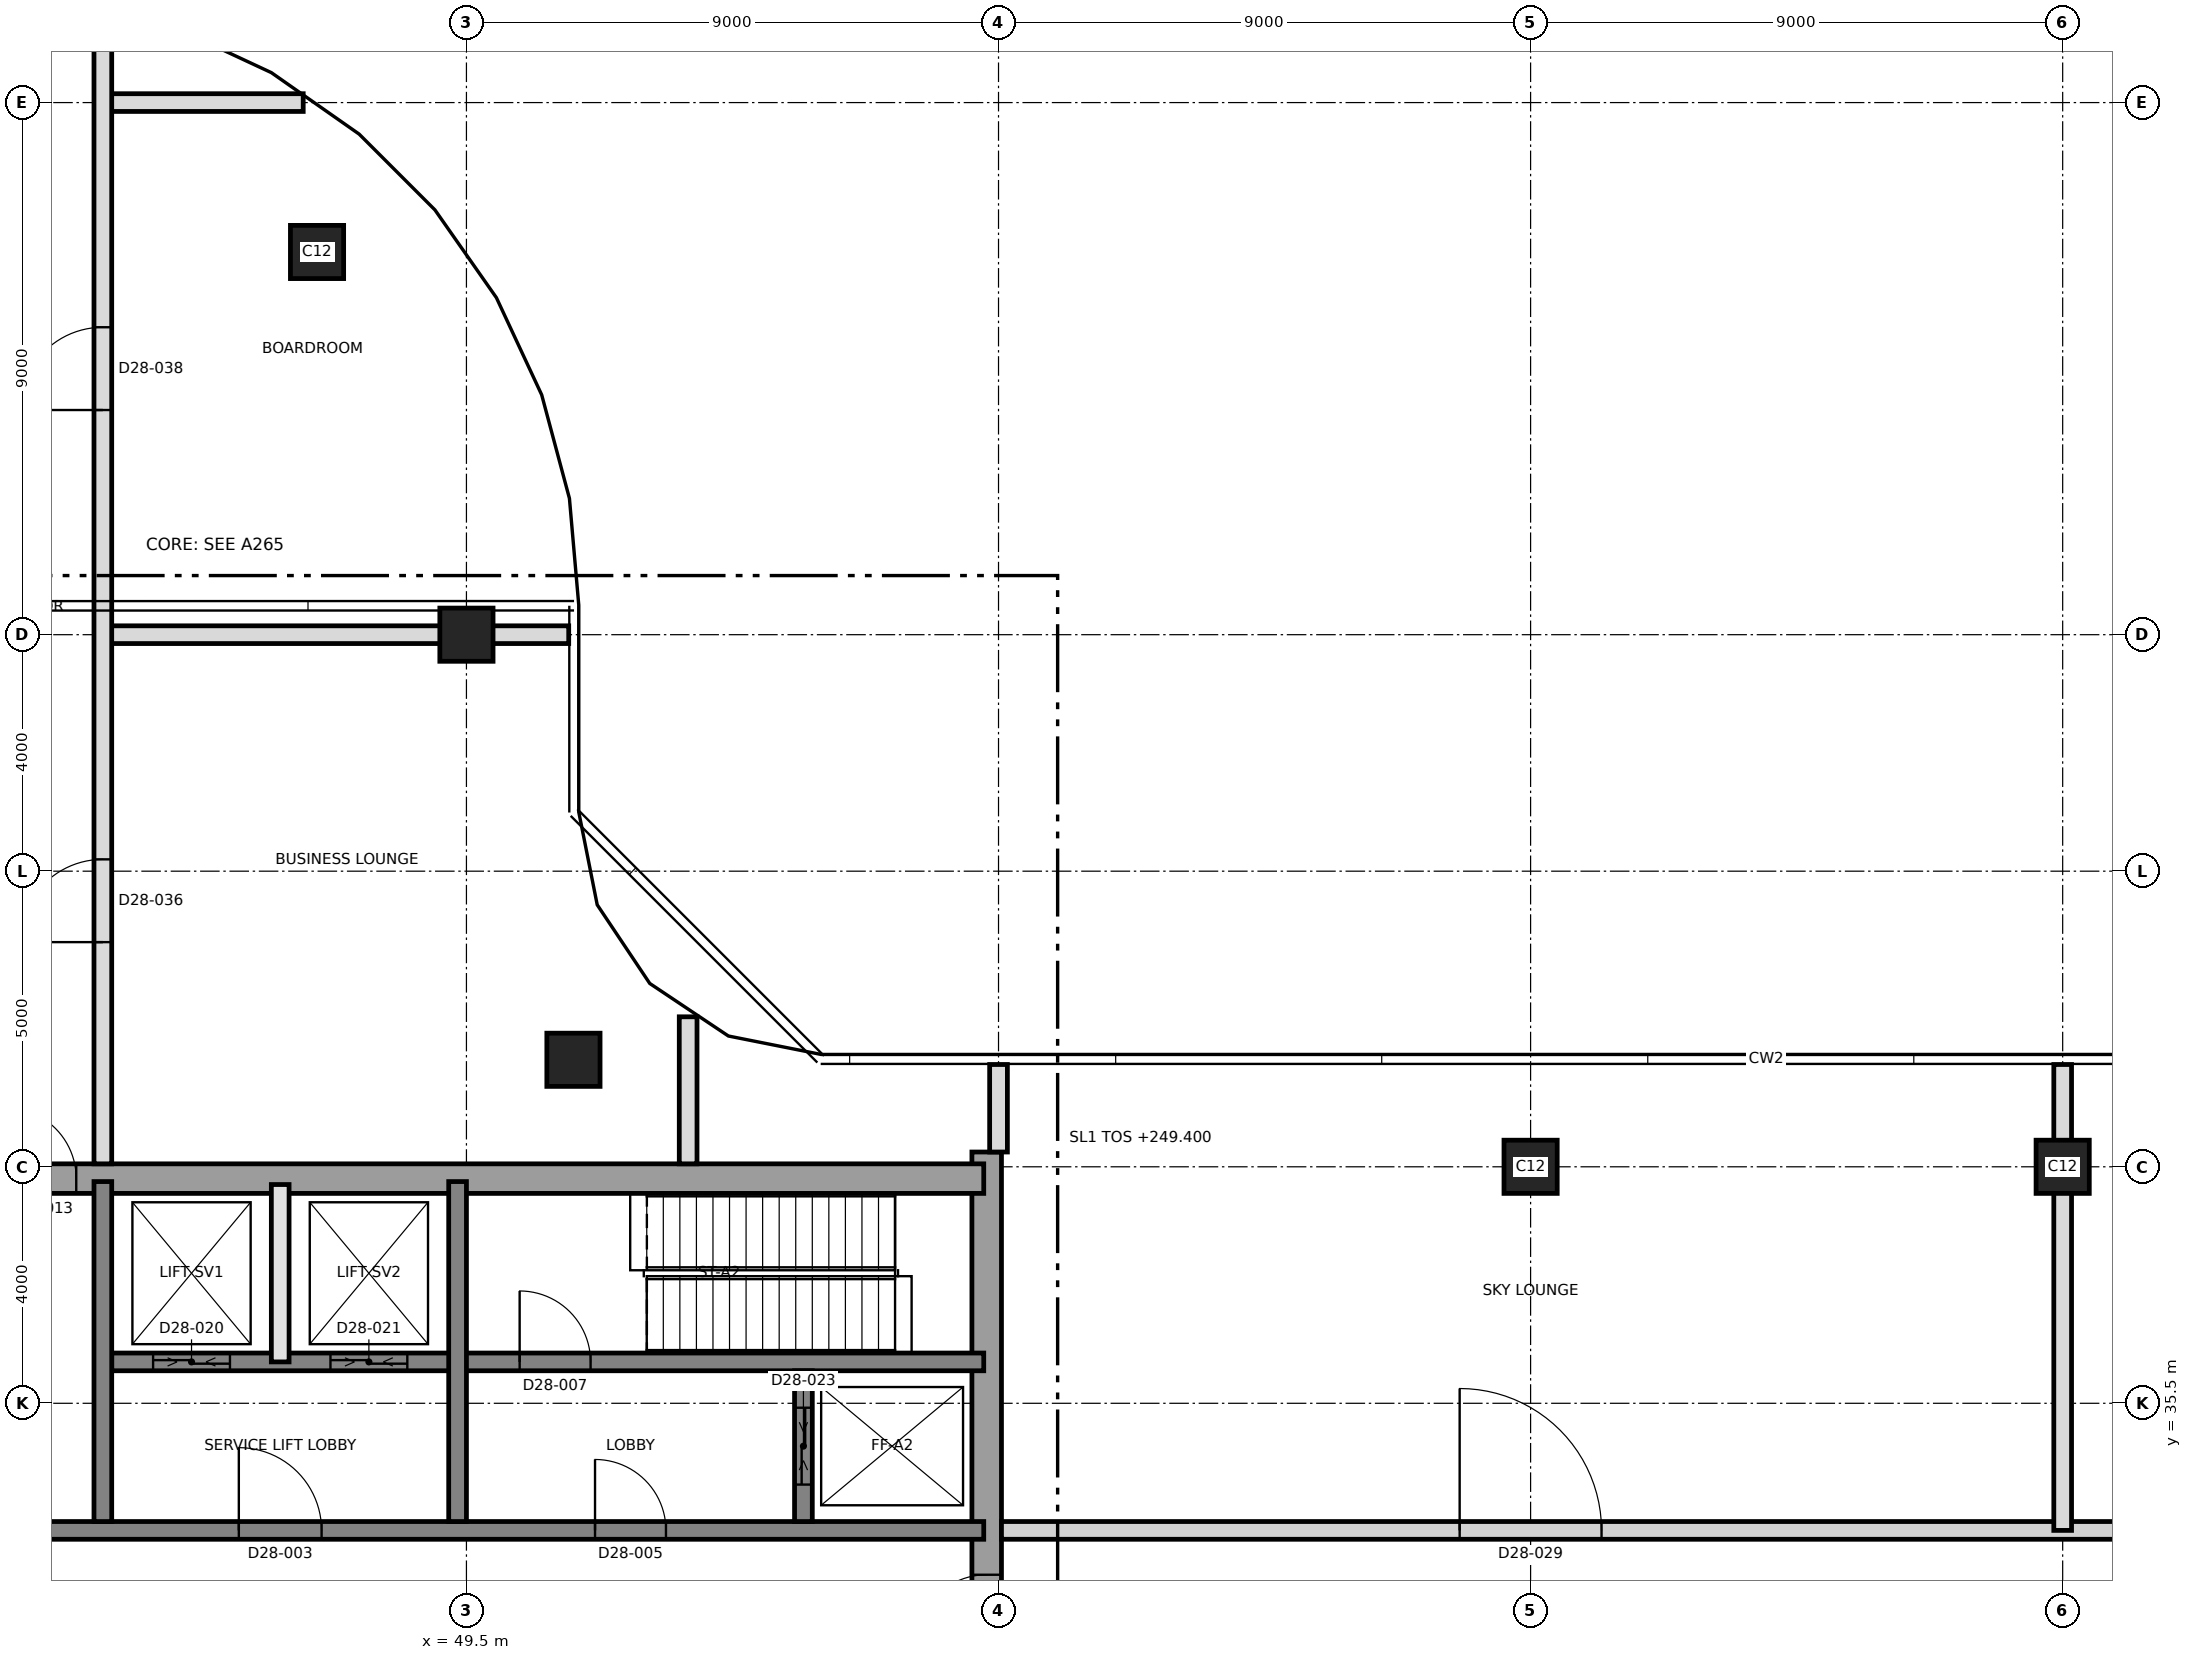
"""IFC4 building model, lengths in metres.
Left out: names, types, materials, properties, quantities, classifications, styles, units other than length and angle.
Written with IfcOpenShell. Run it as: python <this file> out.ifc"""

import sys

from ifc_helpers import new_model, si_unit, direction, frame, frame_2d, origin, origin_2d, place, context, subcontext, project, spatial, rectangle, extrude, element, fill, save


model = new_model("IFC4")
c1 = context("Model", 3, precision=1e-05, world=origin(), true_north=direction((0.0, 1.0)))
c2 = subcontext(c1, "Body", "Model", "MODEL_VIEW")
j1 = project(units=[si_unit("LENGTHUNIT", "METRE"), si_unit("PLANEANGLEUNIT", "RADIAN")], contexts=[c1])
p1 = place(None, origin())
s1 = spatial("IfcSite", under=j1, at=p1, CompositionType="ELEMENT")
p2 = place(p1, origin())
s2 = spatial("IfcBuilding", under=s1, at=p2, CompositionType="ELEMENT")
p3 = place(p2, frame((0.0, 0.0, 249.4)))
s3 = spatial("IfcBuildingStorey", under=s2, at=p3, CompositionType="ELEMENT", Elevation=249.4)
p4 = place(p3, frame((58.3, 21.25, 0.0), z_axis=(0.0, 0.0, 1.0), x_axis=(0.0, 1.0, 0.0)))
e1 = element("IfcWall", 1, at=p4, inside=s3, PredefinedType="SHEAR", context=c2, shape_type="SweptSolid", body=[
    extrude(rectangle(XDim=18.5, YDim=0.5, at=frame_2d((9.25, 0.0))), origin(), (0.0, 0.0, 1.0), 5.5),
])
p5 = place(p4, frame((10.15, 0.0, 0.0)))
e2 = element("IfcOpeningElement", 2, at=p5, cuts=e1, PredefinedType="OPENING", context=c2, shape_type="SweptSolid", body=[
    extrude(rectangle(XDim=1.2, YDim=2.1, at=frame_2d((0.6, 1.05))), frame((0.0, 0.26, 0.0), z_axis=(0.0, -1.0, 0.0), x_axis=(1.0, 0.0, 0.0)), (0.0, 0.0, 1.0), 0.52),
])
p6 = place(p3, frame((31.25, 39.3, 0.0), z_axis=(0.0, 0.0, 1.0), x_axis=(1.0, 0.0, 0.0)))
e3 = element("IfcWall", 3, at=p6, inside=s3, PredefinedType="SHEAR", context=c2, shape_type="SweptSolid", body=[
    extrude(rectangle(XDim=27.0, YDim=0.5, at=frame_2d((13.5, 0.0))), origin(), (0.0, 0.0, 1.0), 5.5),
])
p7 = place(p6, frame((10.45, 0.0, 0.0)))
e4 = element("IfcOpeningElement", 4, at=p7, cuts=e3, PredefinedType="OPENING", context=c2, shape_type="SweptSolid", body=[
    extrude(rectangle(XDim=1.2, YDim=2.1, at=frame_2d((0.6, 1.05))), frame((0.0, 0.26, 0.0), z_axis=(0.0, -1.0, 0.0), x_axis=(1.0, 0.0, 0.0)), (0.0, 0.0, 1.0), 0.52),
])
p8 = place(p3, frame((31.75, 33.35, 0.0), z_axis=(0.0, 0.0, 1.0), x_axis=(1.0, 0.0, 0.0)))
e5 = element("IfcWall", 5, at=p8, inside=s3, PredefinedType="SHEAR", context=c2, shape_type="SweptSolid", body=[
    extrude(rectangle(XDim=26.5, YDim=0.3, at=frame_2d((13.25, 0.0))), origin(), (0.0, 0.0, 1.0), 5.5),
])
p9 = place(p8, frame((13.9, 0.0, 0.0)))
e6 = element("IfcOpeningElement", 6, at=p9, cuts=e5, PredefinedType="OPENING", context=c2, shape_type="SweptSolid", body=[
    extrude(rectangle(XDim=1.4, YDim=2.1, at=frame_2d((0.7, 1.05))), frame((0.0, 0.16, 0.0), z_axis=(0.0, -1.0, 0.0), x_axis=(1.0, 0.0, 0.0)), (0.0, 0.0, 1.0), 0.32),
])
p10 = place(p8, frame((5.375, 0.0, 0.0)))
e7 = element("IfcOpeningElement", 7, at=p10, cuts=e5, PredefinedType="OPENING", context=c2, shape_type="SweptSolid", body=[
    extrude(rectangle(XDim=1.2, YDim=2.1, at=frame_2d((0.6, 1.05))), frame((0.0, 0.16, 0.0), z_axis=(0.0, -1.0, 0.0), x_axis=(1.0, 0.0, 0.0)), (0.0, 0.0, 1.0), 0.32),
])
p11 = place(p8, frame((19.925, 0.0, 0.0)))
e8 = element("IfcOpeningElement", 8, at=p11, cuts=e5, PredefinedType="OPENING", context=c2, shape_type="SweptSolid", body=[
    extrude(rectangle(XDim=1.2, YDim=2.1, at=frame_2d((0.6, 1.05))), frame((0.0, 0.16, 0.0), z_axis=(0.0, -1.0, 0.0), x_axis=(1.0, 0.0, 0.0)), (0.0, 0.0, 1.0), 0.32),
])
p12 = place(p3, frame((43.5, 36.2, 0.0), z_axis=(0.0, 0.0, 1.0), x_axis=(1.0, 0.0, 0.0)))
e9 = element("IfcWall", 9, at=p12, inside=s3, PredefinedType="SHEAR", context=c2, shape_type="SweptSolid", body=[
    extrude(rectangle(XDim=14.75, YDim=0.3, at=frame_2d((7.375, 0.0))), origin(), (0.0, 0.0, 1.0), 5.5),
])
p13 = place(p12, frame((6.9, 0.0, 0.0)))
e10 = element("IfcOpeningElement", 10, at=p13, cuts=e9, PredefinedType="OPENING", context=c2, shape_type="SweptSolid", body=[
    extrude(rectangle(XDim=1.2, YDim=2.1, at=frame_2d((0.6, 1.05))), frame((0.0, 0.16, 0.0), z_axis=(0.0, -1.0, 0.0), x_axis=(1.0, 0.0, 0.0)), (0.0, 0.0, 1.0), 0.32),
])
p14 = place(p12, frame((0.7, 0.0, 0.0)))
e11 = element("IfcOpeningElement", 11, at=p14, cuts=e9, PredefinedType="OPENING", context=c2, shape_type="SweptSolid", body=[
    extrude(rectangle(XDim=1.3, YDim=2.4, at=frame_2d((0.65, 1.2))), frame((0.0, 0.16, 0.0), z_axis=(0.0, -1.0, 0.0), x_axis=(1.0, 0.0, 0.0)), (0.0, 0.0, 1.0), 0.32),
])
p15 = place(p12, frame((3.7, 0.0, 0.0)))
e12 = element("IfcOpeningElement", 12, at=p15, cuts=e9, PredefinedType="OPENING", context=c2, shape_type="SweptSolid", body=[
    extrude(rectangle(XDim=1.3, YDim=2.4, at=frame_2d((0.65, 1.2))), frame((0.0, 0.16, 0.0), z_axis=(0.0, -1.0, 0.0), x_axis=(1.0, 0.0, 0.0)), (0.0, 0.0, 1.0), 0.32),
])
for number, where, z_axis, x_axis in (
    (13, (43.35, 33.5, 0.0), (0.0, 0.0, 1.0), (0.0, 1.0, 0.0)),
    (14, (49.35, 33.5, 0.0), (0.0, 0.0, 1.0), (0.0, 1.0, 0.0)),
):
    element("IfcWall", number, at=place(p3, frame(where, z_axis=z_axis, x_axis=x_axis)), inside=s3, PredefinedType="SHEAR", context=c2, shape_type="SweptSolid", body=[
        extrude(rectangle(XDim=5.75, YDim=0.3, at=frame_2d((2.875, 0.0))), origin(), (0.0, 0.0, 1.0), 5.5),
    ])
p16 = place(p3, frame((55.2, 33.5, 0.0), z_axis=(0.0, 0.0, 1.0), x_axis=(0.0, 1.0, 0.0)))
e15 = element("IfcWall", 15, at=p16, inside=s3, PredefinedType="SHEAR", context=c2, shape_type="SweptSolid", body=[
    extrude(rectangle(XDim=2.55, YDim=0.3, at=frame_2d((1.275, 0.0))), origin(), (0.0, 0.0, 1.0), 5.5),
])
p17 = place(p16, frame((0.625, 0.0, 0.0)))
e16 = element("IfcOpeningElement", 16, at=p17, cuts=e15, PredefinedType="OPENING", context=c2, shape_type="SweptSolid", body=[
    extrude(rectangle(XDim=1.3, YDim=2.4, at=frame_2d((0.65, 1.2))), frame((0.0, 0.16, 0.0), z_axis=(0.0, -1.0, 0.0), x_axis=(1.0, 0.0, 0.0)), (0.0, 0.0, 1.0), 0.32),
])
for number, where, z_axis, x_axis in (
    (17, (67.5, 39.5, 0.0), (0.0, 0.0, 1.0), (1.0, 0.0, 0.0)),
    (18, (76.5, 39.5, 0.0), (0.0, 0.0, 1.0), (1.0, 0.0, 0.0)),
    (19, (51.31, 41.31, 0.0), (0.0, 0.0, 1.0), (1.0, 0.0, 0.0)),
    (20, (49.5, 48.5, 0.0), (0.0, 0.0, 1.0), (1.0, 0.0, 0.0)),
    (21, (46.973, 54.973, 0.0), (0.0, 0.0, 1.0), (1.0, 0.0, 0.0)),
):
    element("IfcColumn", number, at=place(p3, frame(where, z_axis=z_axis, x_axis=x_axis)), inside=s3, PredefinedType="COLUMN", context=c2, shape_type="SweptSolid", body=[
        extrude(rectangle(XDim=0.9, YDim=0.9, at=origin_2d()), origin(), (0.0, 0.0, 1.0), 5.5),
    ])
p18 = place(p3, frame((46.35, 36.2, 0.0), z_axis=(0.0, 0.0, 1.0), x_axis=(0.0, 1.0, 0.0)))
e22 = element("IfcWall", 22, at=p18, inside=s3, PredefinedType="SOLIDWALL", context=c2, shape_type="SweptSolid", body=[
    extrude(rectangle(XDim=3.0, YDim=0.3, at=frame_2d((1.5, 0.0))), origin(), (0.0, 0.0, 1.0), 5.2),
])
p19 = place(p3, frame((58.55, 33.35, 0.0), z_axis=(0.0, 0.0, 1.0), x_axis=(1.0, 0.0, 0.0)))
e23 = element("IfcWall", 23, at=p19, inside=s3, PredefinedType="PARTITIONING", context=c2, shape_type="SweptSolid", body=[
    extrude(rectangle(XDim=26.78, YDim=0.3, at=frame_2d((13.39, 0.0))), origin(), (0.0, 0.0, 1.0), 5.2),
])
p20 = place(p19, frame((7.75, 0.0, 0.0)))
e24 = element("IfcOpeningElement", 24, at=p20, cuts=e23, PredefinedType="OPENING", context=c2, shape_type="SweptSolid", body=[
    extrude(rectangle(XDim=2.4, YDim=2.4, at=frame_2d((1.2, 1.2))), frame((0.0, 0.16, 0.0), z_axis=(0.0, -1.0, 0.0), x_axis=(1.0, 0.0, 0.0)), (0.0, 0.0, 1.0), 0.32),
])
p21 = place(p19, frame((21.25, 0.0, 0.0)))
e25 = element("IfcOpeningElement", 25, at=p21, cuts=e23, PredefinedType="OPENING", context=c2, shape_type="SweptSolid", body=[
    extrude(rectangle(XDim=2.4, YDim=2.4, at=frame_2d((1.2, 1.2))), frame((0.0, 0.16, 0.0), z_axis=(0.0, -1.0, 0.0), x_axis=(1.0, 0.0, 0.0)), (0.0, 0.0, 1.0), 0.32),
])
p22 = place(p3, frame((43.35, 48.5, 0.0), z_axis=(0.0, 0.0, 1.0), x_axis=(1.0, 0.0, 0.0)))
e26 = element("IfcWall", 26, at=p22, inside=s3, PredefinedType="PARTITIONING", context=c2, shape_type="SweptSolid", body=[
    extrude(rectangle(XDim=7.88, YDim=0.3, at=frame_2d((3.94, 0.0))), origin(), (0.0, 0.0, 1.0), 5.2),
])
p23 = place(p3, frame((43.35, 57.5, 0.0), z_axis=(0.0, 0.0, 1.0), x_axis=(1.0, 0.0, 0.0)))
e27 = element("IfcWall", 27, at=p23, inside=s3, PredefinedType="PARTITIONING", context=c2, shape_type="SweptSolid", body=[
    extrude(rectangle(XDim=3.389, YDim=0.3, at=frame_2d((1.694, 0.0))), origin(), (0.0, 0.0, 1.0), 5.2),
])
p24 = place(p3, frame((43.35, 39.55, 0.0), z_axis=(0.0, 0.0, 1.0), x_axis=(0.0, 1.0, 0.0)))
e28 = element("IfcWall", 28, at=p24, inside=s3, PredefinedType="PARTITIONING", context=c2, shape_type="SweptSolid", body=[
    extrude(rectangle(XDim=19.0, YDim=0.3, at=frame_2d((9.5, 0.0))), origin(), (0.0, 0.0, 1.0), 5.2),
])
p25 = place(p24, frame((3.75, 0.0, 0.0)))
e29 = element("IfcOpeningElement", 29, at=p25, cuts=e28, PredefinedType="OPENING", context=c2, shape_type="SweptSolid", body=[
    extrude(rectangle(XDim=1.4, YDim=2.1, at=frame_2d((0.7, 1.05))), frame((0.0, 0.16, 0.0), z_axis=(0.0, -1.0, 0.0), x_axis=(1.0, 0.0, 0.0)), (0.0, 0.0, 1.0), 0.32),
])
p26 = place(p24, frame((12.75, 0.0, 0.0)))
e30 = element("IfcOpeningElement", 30, at=p26, cuts=e28, PredefinedType="OPENING", context=c2, shape_type="SweptSolid", body=[
    extrude(rectangle(XDim=1.4, YDim=2.1, at=frame_2d((0.7, 1.05))), frame((0.0, 0.16, 0.0), z_axis=(0.0, -1.0, 0.0), x_axis=(1.0, 0.0, 0.0)), (0.0, 0.0, 1.0), 0.32),
])
p27 = place(p3, frame((53.25, 39.55, 0.0), z_axis=(0.0, 0.0, 1.0), x_axis=(0.0, 1.0, 0.0)))
e31 = element("IfcWall", 31, at=p27, inside=s3, PredefinedType="PARTITIONING", context=c2, shape_type="SweptSolid", body=[
    extrude(rectangle(XDim=2.487, YDim=0.3, at=frame_2d((1.244, 0.0))), origin(), (0.0, 0.0, 1.0), 5.2),
])
p28 = place(p3, frame((58.5, 39.75, 0.0), z_axis=(0.0, 0.0, 1.0), x_axis=(0.0, 1.0, 0.0)))
e32 = element("IfcWall", 32, at=p28, inside=s3, PredefinedType="PARTITIONING", context=c2, shape_type="SweptSolid", body=[
    extrude(rectangle(XDim=1.48, YDim=0.3, at=frame_2d((0.74, 0.0))), origin(), (0.0, 0.0, 1.0), 5.2),
])
p29 = place(p3, frame((76.5, 33.35, 0.0), z_axis=(0.0, 0.0, 1.0), x_axis=(0.0, 1.0, 0.0)))
e33 = element("IfcWall", 33, at=p29, inside=s3, PredefinedType="PARTITIONING", context=c2, shape_type="SweptSolid", body=[
    extrude(rectangle(XDim=7.88, YDim=0.3, at=frame_2d((3.94, 0.0))), origin(), (0.0, 0.0, 1.0), 5.2),
])
p30 = place(p9, origin())
e34 = element("IfcDoor", 34, at=p30, inside=s3, OperationType="SINGLE_SWING_RIGHT", PredefinedType="DOOR", context=c2, shape_type="SweptSolid", body=[
    extrude(rectangle(XDim=1.4, YDim=2.1, at=frame_2d((0.7, 1.05))), frame((0.0, 0.025, 0.0), z_axis=(0.0, -1.0, 0.0), x_axis=(1.0, 0.0, 0.0)), (0.0, 0.0, 1.0), 0.05),
])
fill(e6, e34)
p31 = place(p11, origin())
e35 = element("IfcDoor", 35, at=p31, inside=s3, OperationType="SINGLE_SWING_RIGHT", PredefinedType="DOOR", context=c2, shape_type="SweptSolid", body=[
    extrude(rectangle(XDim=1.2, YDim=2.1, at=frame_2d((0.6, 1.05))), frame((0.0, 0.025, 0.0), z_axis=(0.0, -1.0, 0.0), x_axis=(1.0, 0.0, 0.0)), (0.0, 0.0, 1.0), 0.05),
])
fill(e8, e35)
p32 = place(p13, origin())
e36 = element("IfcDoor", 36, at=p32, inside=s3, OperationType="SINGLE_SWING_LEFT", PredefinedType="DOOR", context=c2, shape_type="SweptSolid", body=[
    extrude(rectangle(XDim=1.2, YDim=2.1, at=frame_2d((0.6, 1.05))), frame((0.0, 0.025, 0.0), z_axis=(0.0, -1.0, 0.0), x_axis=(1.0, 0.0, 0.0)), (0.0, 0.0, 1.0), 0.05),
])
fill(e10, e36)
p33 = place(p5, origin())
e37 = element("IfcDoor", 37, at=p33, inside=s3, OperationType="SINGLE_SWING_LEFT", PredefinedType="DOOR", context=c2, shape_type="SweptSolid", body=[
    extrude(rectangle(XDim=1.2, YDim=2.1, at=frame_2d((0.6, 1.05))), frame((0.0, 0.025, 0.0), z_axis=(0.0, -1.0, 0.0), x_axis=(1.0, 0.0, 0.0)), (0.0, 0.0, 1.0), 0.05),
])
fill(e2, e37)
p34 = place(p7, origin())
e38 = element("IfcDoor", 38, at=p34, inside=s3, OperationType="SINGLE_SWING_RIGHT", PredefinedType="DOOR", context=c2, shape_type="SweptSolid", body=[
    extrude(rectangle(XDim=1.2, YDim=2.1, at=frame_2d((0.6, 1.05))), frame((0.0, 0.025, 0.0), z_axis=(0.0, -1.0, 0.0), x_axis=(1.0, 0.0, 0.0)), (0.0, 0.0, 1.0), 0.05),
])
fill(e4, e38)
p35 = place(p14, origin())
e39 = element("IfcDoor", 39, at=p35, inside=s3, OperationType="SLIDING_TO_LEFT", PredefinedType="DOOR", context=c2, shape_type="SweptSolid", body=[
    extrude(rectangle(XDim=1.3, YDim=2.4, at=frame_2d((0.65, 1.2))), frame((0.0, 0.025, 0.0), z_axis=(0.0, -1.0, 0.0), x_axis=(1.0, 0.0, 0.0)), (0.0, 0.0, 1.0), 0.05),
])
fill(e11, e39)
p36 = place(p15, origin())
e40 = element("IfcDoor", 40, at=p36, inside=s3, OperationType="SLIDING_TO_LEFT", PredefinedType="DOOR", context=c2, shape_type="SweptSolid", body=[
    extrude(rectangle(XDim=1.3, YDim=2.4, at=frame_2d((0.65, 1.2))), frame((0.0, 0.025, 0.0), z_axis=(0.0, -1.0, 0.0), x_axis=(1.0, 0.0, 0.0)), (0.0, 0.0, 1.0), 0.05),
])
fill(e12, e40)
p37 = place(p17, origin())
e41 = element("IfcDoor", 41, at=p37, inside=s3, OperationType="SLIDING_TO_LEFT", PredefinedType="DOOR", context=c2, shape_type="SweptSolid", body=[
    extrude(rectangle(XDim=1.3, YDim=2.4, at=frame_2d((0.65, 1.2))), frame((0.0, 0.025, 0.0), z_axis=(0.0, -1.0, 0.0), x_axis=(1.0, 0.0, 0.0)), (0.0, 0.0, 1.0), 0.05),
])
fill(e16, e41)
p38 = place(p20, origin())
e42 = element("IfcDoor", 42, at=p38, inside=s3, OperationType="SINGLE_SWING_LEFT", PredefinedType="DOOR", context=c2, shape_type="SweptSolid", body=[
    extrude(rectangle(XDim=2.4, YDim=2.4, at=frame_2d((1.2, 1.2))), frame((0.0, 0.025, 0.0), z_axis=(0.0, -1.0, 0.0), x_axis=(1.0, 0.0, 0.0)), (0.0, 0.0, 1.0), 0.05),
])
fill(e24, e42)
p39 = place(p25, origin())
e43 = element("IfcDoor", 43, at=p39, inside=s3, OperationType="SINGLE_SWING_LEFT", PredefinedType="DOOR", context=c2, shape_type="SweptSolid", body=[
    extrude(rectangle(XDim=1.4, YDim=2.1, at=frame_2d((0.7, 1.05))), frame((0.0, 0.025, 0.0), z_axis=(0.0, -1.0, 0.0), x_axis=(1.0, 0.0, 0.0)), (0.0, 0.0, 1.0), 0.05),
])
fill(e29, e43)
p40 = place(p26, origin())
e44 = element("IfcDoor", 44, at=p40, inside=s3, OperationType="SINGLE_SWING_LEFT", PredefinedType="DOOR", context=c2, shape_type="SweptSolid", body=[
    extrude(rectangle(XDim=1.4, YDim=2.1, at=frame_2d((0.7, 1.05))), frame((0.0, 0.025, 0.0), z_axis=(0.0, -1.0, 0.0), x_axis=(1.0, 0.0, 0.0)), (0.0, 0.0, 1.0), 0.05),
])
fill(e30, e44)
save(model, sys.argv[1])
